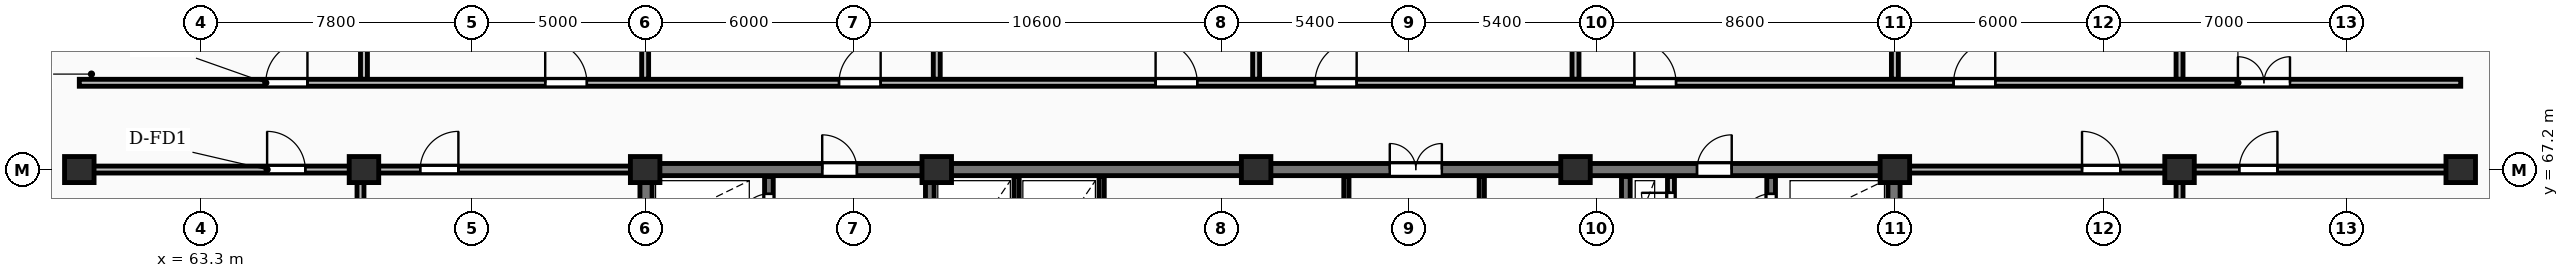
"""IFC4 building model, lengths in metres.
Left out: names, types, materials, properties, quantities, classifications, styles, units other than length and angle.
Written with IfcOpenShell. Run it as: python <this file> out.ifc"""

import sys

from ifc_helpers import new_model, si_unit, direction, frame, frame_2d, origin, origin_2d, place, context, subcontext, project, spatial, rectangle, extrude, element, fill, save


model = new_model("IFC4")
c1 = context("Model", 3, precision=1e-05, world=origin(), true_north=direction((0.0, 1.0)))
c2 = subcontext(c1, "Body", "Model", "MODEL_VIEW")
j1 = project(units=[si_unit("LENGTHUNIT", "METRE"), si_unit("PLANEANGLEUNIT", "RADIAN")], contexts=[c1])
p1 = place(None, origin())
s1 = spatial("IfcSite", under=j1, at=p1, CompositionType="ELEMENT")
p2 = place(p1, origin())
s2 = spatial("IfcBuilding", under=s1, at=p2, CompositionType="ELEMENT")
p3 = place(p2, frame((0.0, 0.0, 223.85)))
s3 = spatial("IfcBuildingStorey", under=s2, at=p3, CompositionType="ELEMENT", Elevation=223.85)
for number, where, z_axis, x_axis in (
    (1, (59.8, 67.2, 0.0), (0.0, 0.0, 1.0), (1.0, 0.0, 0.0)),
    (2, (68.0, 67.2, 0.0), (0.0, 0.0, 1.0), (1.0, 0.0, 0.0)),
    (3, (76.1, 67.2, 0.0), (0.0, 0.0, 1.0), (1.0, 0.0, 0.0)),
    (4, (84.5, 67.2, 0.0), (0.0, 0.0, 1.0), (1.0, 0.0, 0.0)),
    (5, (93.7, 67.2, 0.0), (0.0, 0.0, 1.0), (1.0, 0.0, 0.0)),
    (6, (102.9, 67.2, 0.0), (0.0, 0.0, 1.0), (1.0, 0.0, 0.0)),
    (7, (112.1, 67.2, 0.0), (0.0, 0.0, 1.0), (1.0, 0.0, 0.0)),
    (8, (120.3, 67.2, 0.0), (0.0, 0.0, 1.0), (1.0, 0.0, 0.0)),
    (9, (128.4, 67.2, 0.0), (0.0, 0.0, 1.0), (1.0, 0.0, 0.0)),
):
    element("IfcColumn", number, at=place(p3, frame(where, z_axis=z_axis, x_axis=x_axis)), inside=s3, PredefinedType="COLUMN", context=c2, shape_type="SweptSolid", body=[
        extrude(rectangle(XDim=0.85, YDim=0.75, at=origin_2d()), origin(), (0.0, 0.0, 1.0), 4.8),
    ])
for number, where, z_axis, x_axis in (
    (10, (76.125, 55.375, 0.0), (0.0, 0.0, 1.0), (0.0, 1.0, 0.0)),
    (11, (112.075, 55.375, 0.0), (0.0, 0.0, 1.0), (0.0, 1.0, 0.0)),
):
    element("IfcWall", number, at=place(p3, frame(where, z_axis=z_axis, x_axis=x_axis)), inside=s3, PredefinedType="SHEAR", context=c2, shape_type="SweptSolid", body=[
        extrude(rectangle(XDim=11.65, YDim=0.35, at=frame_2d((5.825, 0.0))), origin(), (0.0, 0.0, 1.0), 4.8),
    ])
p4 = place(p3, frame((75.95, 67.2, 0.0), z_axis=(0.0, 0.0, 1.0), x_axis=(1.0, 0.0, 0.0)))
e12 = element("IfcWall", 12, at=p4, inside=s3, PredefinedType="SHEAR", context=c2, shape_type="SweptSolid", body=[
    extrude(rectangle(XDim=36.3, YDim=0.35, at=frame_2d((18.15, 0.0))), origin(), (0.0, 0.0, 1.0), 4.8),
])
p5 = place(p4, frame((5.25, 0.0, 0.0)))
e13 = element("IfcOpeningElement", 13, at=p5, cuts=e12, PredefinedType="OPENING", context=c2, shape_type="SweptSolid", body=[
    extrude(rectangle(XDim=1.0, YDim=2.15, at=frame_2d((0.5, 1.075))), frame((0.0, 0.185, 0.0), z_axis=(0.0, -1.0, 0.0), x_axis=(1.0, 0.0, 0.0)), (0.0, 0.0, 1.0), 0.37),
])
p6 = place(p4, frame((21.6, 0.0, 0.0)))
e14 = element("IfcOpeningElement", 14, at=p6, cuts=e12, PredefinedType="OPENING", context=c2, shape_type="SweptSolid", body=[
    extrude(rectangle(XDim=1.5, YDim=2.2, at=frame_2d((0.75, 1.1))), frame((0.0, 0.185, 0.0), z_axis=(0.0, -1.0, 0.0), x_axis=(1.0, 0.0, 0.0)), (0.0, 0.0, 1.0), 0.37),
])
p7 = place(p4, frame((30.45, 0.0, 0.0)))
e15 = element("IfcOpeningElement", 15, at=p7, cuts=e12, PredefinedType="OPENING", context=c2, shape_type="SweptSolid", body=[
    extrude(rectangle(XDim=1.0, YDim=2.15, at=frame_2d((0.5, 1.075))), frame((0.0, 0.185, 0.0), z_axis=(0.0, -1.0, 0.0), x_axis=(1.0, 0.0, 0.0)), (0.0, 0.0, 1.0), 0.37),
])
p8 = place(p3, frame((79.665, 55.4, 0.0), z_axis=(0.0, 0.0, 1.0), x_axis=(0.0, 1.0, 0.0)))
e16 = element("IfcWall", 16, at=p8, inside=s3, PredefinedType="SHEAR", context=c2, shape_type="SweptSolid", body=[
    extrude(rectangle(XDim=11.6, YDim=0.25, at=frame_2d((5.8, 0.0))), origin(), (0.0, 0.0, 1.0), 4.8),
])
p9 = place(p8, frame((0.55, 0.0, 0.0)))
e17 = element("IfcOpeningElement", 17, at=p9, cuts=e16, PredefinedType="OPENING", context=c2, shape_type="SweptSolid", body=[
    extrude(rectangle(XDim=0.85, YDim=2.05, at=frame_2d((0.425, 1.025))), frame((0.0, 0.135, 0.0), z_axis=(0.0, -1.0, 0.0), x_axis=(1.0, 0.0, 0.0)), (0.0, 0.0, 1.0), 0.27),
])
p10 = place(p8, frame((8.4, 0.0, 0.0)))
e18 = element("IfcOpeningElement", 18, at=p10, cuts=e16, PredefinedType="OPENING", context=c2, shape_type="SweptSolid", body=[
    extrude(rectangle(XDim=1.1, YDim=2.1, at=frame_2d((0.55, 1.05))), frame((0.0, 0.135, 0.0), z_axis=(0.0, -1.0, 0.0), x_axis=(1.0, 0.0, 0.0)), (0.0, 0.0, 1.0), 0.27),
])
p11 = place(p8, frame((10.25, 0.0, 0.0)))
e19 = element("IfcOpeningElement", 19, at=p11, cuts=e16, PredefinedType="OPENING", context=c2, shape_type="SweptSolid", body=[
    extrude(rectangle(XDim=0.85, YDim=2.05, at=frame_2d((0.425, 1.025))), frame((0.0, 0.135, 0.0), z_axis=(0.0, -1.0, 0.0), x_axis=(1.0, 0.0, 0.0)), (0.0, 0.0, 1.0), 0.27),
])
p12 = place(p3, frame((84.3, 55.4, 0.0), z_axis=(0.0, 0.0, 1.0), x_axis=(0.0, 1.0, 0.0)))
e20 = element("IfcWall", 20, at=p12, inside=s3, PredefinedType="SHEAR", context=c2, shape_type="SweptSolid", body=[
    extrude(rectangle(XDim=11.6, YDim=0.25, at=frame_2d((5.8, 0.0))), origin(), (0.0, 0.0, 1.0), 4.8),
])
p13 = place(p12, frame((5.2, 0.0, 0.0)))
e21 = element("IfcOpeningElement", 21, at=p13, cuts=e20, PredefinedType="OPENING", context=c2, shape_type="SweptSolid", body=[
    extrude(rectangle(XDim=1.1, YDim=2.1, at=frame_2d((0.55, 1.05))), frame((0.0, 0.135, 0.0), z_axis=(0.0, -1.0, 0.0), x_axis=(1.0, 0.0, 0.0)), (0.0, 0.0, 1.0), 0.27),
])
for number, where, z_axis, x_axis in (
    (22, (86.8, 63.4, 0.0), (0.0, 0.0, 1.0), (0.0, 1.0, 0.0)),
    (23, (89.25, 63.4, 0.0), (0.0, 0.0, 1.0), (0.0, 1.0, 0.0)),
    (24, (96.3, 63.4, 0.0), (0.0, 0.0, 1.0), (0.0, 1.0, 0.0)),
    (25, (100.2, 63.4, 0.0), (0.0, 0.0, 1.0), (0.0, 1.0, 0.0)),
):
    element("IfcWall", number, at=place(p3, frame(where, z_axis=z_axis, x_axis=x_axis)), inside=s3, PredefinedType="PARTITIONING", context=c2, shape_type="SweptSolid", body=[
        extrude(rectangle(XDim=3.6, YDim=0.15, at=frame_2d((1.8, 0.0))), origin(), (0.0, 0.0, 1.0), 4.48),
    ])
p14 = place(p3, frame((105.65, 65.28, 0.0), z_axis=(0.0, 0.0, 1.0), x_axis=(0.0, 1.0, 0.0)))
e26 = element("IfcWall", 26, at=p14, inside=s3, PredefinedType="PARTITIONING", context=c2, shape_type="SweptSolid", body=[
    extrude(rectangle(XDim=1.72, YDim=0.2, at=frame_2d((0.86, 0.0))), origin(), (0.0, 0.0, 1.0), 4.48),
])
p15 = place(p14, frame((0.4, 0.0, 0.0)))
e27 = element("IfcOpeningElement", 27, at=p15, cuts=e26, PredefinedType="OPENING", context=c2, shape_type="SweptSolid", body=[
    extrude(rectangle(XDim=0.85, YDim=2.05, at=frame_2d((0.425, 1.025))), frame((0.0, 0.11, 0.0), z_axis=(0.0, -1.0, 0.0), x_axis=(1.0, 0.0, 0.0)), (0.0, 0.0, 1.0), 0.22),
])
p16 = place(p3, frame((104.35, 58.4, 0.0), z_axis=(0.0, 0.0, 1.0), x_axis=(0.0, 1.0, 0.0)))
e28 = element("IfcWall", 28, at=p16, inside=s3, PredefinedType="SHEAR", context=c2, shape_type="SweptSolid", body=[
    extrude(rectangle(XDim=8.6, YDim=0.25, at=frame_2d((4.3, 0.0))), origin(), (0.0, 0.0, 1.0), 4.8),
])
p17 = place(p16, frame((1.8, 0.0, 0.0)))
e29 = element("IfcOpeningElement", 29, at=p17, cuts=e28, PredefinedType="OPENING", context=c2, shape_type="SweptSolid", body=[
    extrude(rectangle(XDim=1.1, YDim=2.1, at=frame_2d((0.55, 1.05))), frame((0.0, 0.135, 0.0), z_axis=(0.0, -1.0, 0.0), x_axis=(1.0, 0.0, 0.0)), (0.0, 0.0, 1.0), 0.27),
])
p18 = place(p3, frame((108.535, 55.4, 0.0), z_axis=(0.0, 0.0, 1.0), x_axis=(0.0, 1.0, 0.0)))
e30 = element("IfcWall", 30, at=p18, inside=s3, PredefinedType="SHEAR", context=c2, shape_type="SweptSolid", body=[
    extrude(rectangle(XDim=11.6, YDim=0.25, at=frame_2d((5.8, 0.0))), origin(), (0.0, 0.0, 1.0), 4.8),
])
p19 = place(p18, frame((8.2, 0.0, 0.0)))
e31 = element("IfcOpeningElement", 31, at=p19, cuts=e30, PredefinedType="OPENING", context=c2, shape_type="SweptSolid", body=[
    extrude(rectangle(XDim=1.1, YDim=2.1, at=frame_2d((0.55, 1.05))), frame((0.0, 0.135, 0.0), z_axis=(0.0, -1.0, 0.0), x_axis=(1.0, 0.0, 0.0)), (0.0, 0.0, 1.0), 0.27),
])
p20 = place(p18, frame((10.25, 0.0, 0.0)))
e32 = element("IfcOpeningElement", 32, at=p20, cuts=e30, PredefinedType="OPENING", context=c2, shape_type="SweptSolid", body=[
    extrude(rectangle(XDim=0.85, YDim=2.05, at=frame_2d((0.425, 1.025))), frame((0.0, 0.135, 0.0), z_axis=(0.0, -1.0, 0.0), x_axis=(1.0, 0.0, 0.0)), (0.0, 0.0, 1.0), 0.27),
])
for number, where, z_axis, x_axis in (
    (33, (68.0, 69.8, 0.0), (0.0, 0.0, 1.0), (0.0, 1.0, 0.0)),
    (34, (76.1, 69.8, 0.0), (0.0, 0.0, 1.0), (0.0, 1.0, 0.0)),
    (35, (84.5, 69.8, 0.0), (0.0, 0.0, 1.0), (0.0, 1.0, 0.0)),
    (36, (93.7, 69.8, 0.0), (0.0, 0.0, 1.0), (0.0, 1.0, 0.0)),
    (37, (102.9, 69.8, 0.0), (0.0, 0.0, 1.0), (0.0, 1.0, 0.0)),
    (38, (112.1, 69.8, 0.0), (0.0, 0.0, 1.0), (0.0, 1.0, 0.0)),
    (39, (120.3, 69.8, 0.0), (0.0, 0.0, 1.0), (0.0, 1.0, 0.0)),
):
    element("IfcWall", number, at=place(p3, frame(where, z_axis=z_axis, x_axis=x_axis)), inside=s3, PredefinedType="PARTITIONING", context=c2, shape_type="SweptSolid", body=[
        extrude(rectangle(XDim=9.25, YDim=0.2, at=frame_2d((4.625, 0.0))), origin(), (0.0, 0.0, 1.0), 3.23),
    ])
p21 = place(p3, frame((59.8, 69.7, 0.0), z_axis=(0.0, 0.0, 1.0), x_axis=(1.0, 0.0, 0.0)))
e40 = element("IfcWall", 40, at=p21, inside=s3, PredefinedType="PARTITIONING", context=c2, shape_type="SweptSolid", body=[
    extrude(rectangle(XDim=68.6, YDim=0.2, at=frame_2d((34.3, 0.0))), origin(), (0.0, 0.0, 1.0), 4.48),
])
p22 = place(p21, frame((5.372, 0.0, 0.0)))
e41 = element("IfcOpeningElement", 41, at=p22, cuts=e40, PredefinedType="OPENING", context=c2, shape_type="SweptSolid", body=[
    extrude(rectangle(XDim=1.2, YDim=2.15, at=frame_2d((0.6, 1.075))), frame((0.0, 0.11, 0.0), z_axis=(0.0, -1.0, 0.0), x_axis=(1.0, 0.0, 0.0)), (0.0, 0.0, 1.0), 0.22),
])
p23 = place(p21, frame((13.421, 0.0, 0.0)))
e42 = element("IfcOpeningElement", 42, at=p23, cuts=e40, PredefinedType="OPENING", context=c2, shape_type="SweptSolid", body=[
    extrude(rectangle(XDim=1.2, YDim=2.15, at=frame_2d((0.6, 1.075))), frame((0.0, 0.11, 0.0), z_axis=(0.0, -1.0, 0.0), x_axis=(1.0, 0.0, 0.0)), (0.0, 0.0, 1.0), 0.22),
])
p24 = place(p21, frame((21.884, 0.0, 0.0)))
e43 = element("IfcOpeningElement", 43, at=p24, cuts=e40, PredefinedType="OPENING", context=c2, shape_type="SweptSolid", body=[
    extrude(rectangle(XDim=1.2, YDim=2.15, at=frame_2d((0.6, 1.075))), frame((0.0, 0.11, 0.0), z_axis=(0.0, -1.0, 0.0), x_axis=(1.0, 0.0, 0.0)), (0.0, 0.0, 1.0), 0.22),
])
p25 = place(p21, frame((31.004, 0.0, 0.0)))
e44 = element("IfcOpeningElement", 44, at=p25, cuts=e40, PredefinedType="OPENING", context=c2, shape_type="SweptSolid", body=[
    extrude(rectangle(XDim=1.2, YDim=2.15, at=frame_2d((0.6, 1.075))), frame((0.0, 0.11, 0.0), z_axis=(0.0, -1.0, 0.0), x_axis=(1.0, 0.0, 0.0)), (0.0, 0.0, 1.0), 0.22),
])
p26 = place(p21, frame((35.596, 0.0, 0.0)))
e45 = element("IfcOpeningElement", 45, at=p26, cuts=e40, PredefinedType="OPENING", context=c2, shape_type="SweptSolid", body=[
    extrude(rectangle(XDim=1.2, YDim=2.15, at=frame_2d((0.6, 1.075))), frame((0.0, 0.11, 0.0), z_axis=(0.0, -1.0, 0.0), x_axis=(1.0, 0.0, 0.0)), (0.0, 0.0, 1.0), 0.22),
])
p27 = place(p21, frame((44.796, 0.0, 0.0)))
e46 = element("IfcOpeningElement", 46, at=p27, cuts=e40, PredefinedType="OPENING", context=c2, shape_type="SweptSolid", body=[
    extrude(rectangle(XDim=1.2, YDim=2.15, at=frame_2d((0.6, 1.075))), frame((0.0, 0.11, 0.0), z_axis=(0.0, -1.0, 0.0), x_axis=(1.0, 0.0, 0.0)), (0.0, 0.0, 1.0), 0.22),
])
p28 = place(p21, frame((53.991, 0.0, 0.0)))
e47 = element("IfcOpeningElement", 47, at=p28, cuts=e40, PredefinedType="OPENING", context=c2, shape_type="SweptSolid", body=[
    extrude(rectangle(XDim=1.2, YDim=2.15, at=frame_2d((0.6, 1.075))), frame((0.0, 0.11, 0.0), z_axis=(0.0, -1.0, 0.0), x_axis=(1.0, 0.0, 0.0)), (0.0, 0.0, 1.0), 0.22),
])
p29 = place(p21, frame((62.182, 0.0, 0.0)))
e48 = element("IfcOpeningElement", 48, at=p29, cuts=e40, PredefinedType="OPENING", context=c2, shape_type="SweptSolid", body=[
    extrude(rectangle(XDim=1.5, YDim=2.18, at=frame_2d((0.75, 1.09))), frame((0.0, 0.11, 0.0), z_axis=(0.0, -1.0, 0.0), x_axis=(1.0, 0.0, 0.0)), (0.0, 0.0, 1.0), 0.22),
])
p30 = place(p3, frame((67.9, 51.75, 0.0), z_axis=(0.0, 0.0, 1.0), x_axis=(0.0, 1.0, 0.0)))
e49 = element("IfcWall", 49, at=p30, inside=s3, PredefinedType="PARTITIONING", context=c2, shape_type="SweptSolid", body=[
    extrude(rectangle(XDim=15.4, YDim=0.2, at=frame_2d((7.7, 0.0))), origin(), (0.0, 0.0, 1.0), 3.23),
])
p31 = place(p3, frame((59.85, 67.2, 0.0), z_axis=(0.0, 0.0, 1.0), x_axis=(1.0, 0.0, 0.0)))
e50 = element("IfcWall", 50, at=p31, inside=s3, PredefinedType="PARTITIONING", context=c2, shape_type="SweptSolid", body=[
    extrude(rectangle(XDim=16.1, YDim=0.2, at=frame_2d((8.05, 0.0))), origin(), (0.0, 0.0, 1.0), 3.23),
])
p32 = place(p31, frame((5.36, 0.0, 0.0)))
e51 = element("IfcOpeningElement", 51, at=p32, cuts=e50, PredefinedType="OPENING", context=c2, shape_type="SweptSolid", body=[
    extrude(rectangle(XDim=1.1, YDim=2.1, at=frame_2d((0.55, 1.05))), frame((0.0, 0.11, 0.0), z_axis=(0.0, -1.0, 0.0), x_axis=(1.0, 0.0, 0.0)), (0.0, 0.0, 1.0), 0.22),
])
p33 = place(p31, frame((9.77, 0.0, 0.0)))
e52 = element("IfcOpeningElement", 52, at=p33, cuts=e50, PredefinedType="OPENING", context=c2, shape_type="SweptSolid", body=[
    extrude(rectangle(XDim=1.1, YDim=2.1, at=frame_2d((0.55, 1.05))), frame((0.0, 0.11, 0.0), z_axis=(0.0, -1.0, 0.0), x_axis=(1.0, 0.0, 0.0)), (0.0, 0.0, 1.0), 0.22),
])
p34 = place(p3, frame((120.3, 51.75, 0.0), z_axis=(0.0, 0.0, 1.0), x_axis=(0.0, 1.0, 0.0)))
e53 = element("IfcWall", 53, at=p34, inside=s3, PredefinedType="PARTITIONING", context=c2, shape_type="SweptSolid", body=[
    extrude(rectangle(XDim=15.4, YDim=0.2, at=frame_2d((7.7, 0.0))), origin(), (0.0, 0.0, 1.0), 3.23),
])
p35 = place(p3, frame((112.25, 67.2, 0.0), z_axis=(0.0, 0.0, 1.0), x_axis=(1.0, 0.0, 0.0)))
e54 = element("IfcWall", 54, at=p35, inside=s3, PredefinedType="PARTITIONING", context=c2, shape_type="SweptSolid", body=[
    extrude(rectangle(XDim=16.1, YDim=0.2, at=frame_2d((8.05, 0.0))), origin(), (0.0, 0.0, 1.0), 3.23),
])
p36 = place(p35, frame((5.241, 0.0, 0.0)))
e55 = element("IfcOpeningElement", 55, at=p36, cuts=e54, PredefinedType="OPENING", context=c2, shape_type="SweptSolid", body=[
    extrude(rectangle(XDim=1.1, YDim=2.1, at=frame_2d((0.55, 1.05))), frame((0.0, 0.11, 0.0), z_axis=(0.0, -1.0, 0.0), x_axis=(1.0, 0.0, 0.0)), (0.0, 0.0, 1.0), 0.22),
])
p37 = place(p35, frame((9.77, 0.0, 0.0)))
e56 = element("IfcOpeningElement", 56, at=p37, cuts=e54, PredefinedType="OPENING", context=c2, shape_type="SweptSolid", body=[
    extrude(rectangle(XDim=1.1, YDim=2.1, at=frame_2d((0.55, 1.05))), frame((0.0, 0.11, 0.0), z_axis=(0.0, -1.0, 0.0), x_axis=(1.0, 0.0, 0.0)), (0.0, 0.0, 1.0), 0.22),
])
p38 = place(p5, origin())
e57 = element("IfcDoor", 57, at=p38, inside=s3, OperationType="SINGLE_SWING_LEFT", PredefinedType="DOOR", context=c2, shape_type="SweptSolid", body=[
    extrude(rectangle(XDim=1.0, YDim=2.15, at=frame_2d((0.5, 1.075))), frame((0.0, 0.025, 0.0), z_axis=(0.0, -1.0, 0.0), x_axis=(1.0, 0.0, 0.0)), (0.0, 0.0, 1.0), 0.05),
])
fill(e13, e57)
p39 = place(p6, origin())
e58 = element("IfcDoor", 58, at=p39, inside=s3, OperationType="DOUBLE_DOOR_SINGLE_SWING", PredefinedType="DOOR", context=c2, shape_type="SweptSolid", body=[
    extrude(rectangle(XDim=1.5, YDim=2.2, at=frame_2d((0.75, 1.1))), frame((0.0, 0.025, 0.0), z_axis=(0.0, -1.0, 0.0), x_axis=(1.0, 0.0, 0.0)), (0.0, 0.0, 1.0), 0.05),
])
fill(e14, e58)
p40 = place(p7, origin())
e59 = element("IfcDoor", 59, at=p40, inside=s3, OperationType="SINGLE_SWING_RIGHT", PredefinedType="DOOR", context=c2, shape_type="SweptSolid", body=[
    extrude(rectangle(XDim=1.0, YDim=2.15, at=frame_2d((0.5, 1.075))), frame((0.0, 0.025, 0.0), z_axis=(0.0, -1.0, 0.0), x_axis=(1.0, 0.0, 0.0)), (0.0, 0.0, 1.0), 0.05),
])
fill(e15, e59)
p41 = place(p11, origin())
e60 = element("IfcDoor", 60, at=p41, inside=s3, OperationType="SINGLE_SWING_LEFT", PredefinedType="DOOR", context=c2, shape_type="SweptSolid", body=[
    extrude(rectangle(XDim=0.85, YDim=2.05, at=frame_2d((0.425, 1.025))), frame((0.0, 0.025, 0.0), z_axis=(0.0, -1.0, 0.0), x_axis=(1.0, 0.0, 0.0)), (0.0, 0.0, 1.0), 0.05),
])
fill(e19, e60)
p42 = place(p15, origin())
e61 = element("IfcDoor", 61, at=p42, inside=s3, OperationType="SINGLE_SWING_RIGHT", PredefinedType="DOOR", context=c2, shape_type="SweptSolid", body=[
    extrude(rectangle(XDim=0.85, YDim=2.05, at=frame_2d((0.425, 1.025))), frame((0.0, 0.025, 0.0), z_axis=(0.0, -1.0, 0.0), x_axis=(1.0, 0.0, 0.0)), (0.0, 0.0, 1.0), 0.05),
])
fill(e27, e61)
p43 = place(p20, origin())
e62 = element("IfcDoor", 62, at=p43, inside=s3, OperationType="SINGLE_SWING_LEFT", PredefinedType="DOOR", context=c2, shape_type="SweptSolid", body=[
    extrude(rectangle(XDim=0.85, YDim=2.05, at=frame_2d((0.425, 1.025))), frame((0.0, 0.025, 0.0), z_axis=(0.0, -1.0, 0.0), x_axis=(1.0, 0.0, 0.0)), (0.0, 0.0, 1.0), 0.05),
])
fill(e32, e62)
p44 = place(p22, origin())
e63 = element("IfcDoor", 63, at=p44, inside=s3, OperationType="SINGLE_SWING_RIGHT", PredefinedType="DOOR", context=c2, shape_type="SweptSolid", body=[
    extrude(rectangle(XDim=1.2, YDim=2.15, at=frame_2d((0.6, 1.075))), frame((0.0, 0.025, 0.0), z_axis=(0.0, -1.0, 0.0), x_axis=(1.0, 0.0, 0.0)), (0.0, 0.0, 1.0), 0.05),
])
fill(e41, e63)
p45 = place(p23, origin())
e64 = element("IfcDoor", 64, at=p45, inside=s3, OperationType="SINGLE_SWING_LEFT", PredefinedType="DOOR", context=c2, shape_type="SweptSolid", body=[
    extrude(rectangle(XDim=1.2, YDim=2.15, at=frame_2d((0.6, 1.075))), frame((0.0, 0.025, 0.0), z_axis=(0.0, -1.0, 0.0), x_axis=(1.0, 0.0, 0.0)), (0.0, 0.0, 1.0), 0.05),
])
fill(e42, e64)
p46 = place(p24, origin())
e65 = element("IfcDoor", 65, at=p46, inside=s3, OperationType="SINGLE_SWING_RIGHT", PredefinedType="DOOR", context=c2, shape_type="SweptSolid", body=[
    extrude(rectangle(XDim=1.2, YDim=2.15, at=frame_2d((0.6, 1.075))), frame((0.0, 0.025, 0.0), z_axis=(0.0, -1.0, 0.0), x_axis=(1.0, 0.0, 0.0)), (0.0, 0.0, 1.0), 0.05),
])
fill(e43, e65)
p47 = place(p25, origin())
e66 = element("IfcDoor", 66, at=p47, inside=s3, OperationType="SINGLE_SWING_LEFT", PredefinedType="DOOR", context=c2, shape_type="SweptSolid", body=[
    extrude(rectangle(XDim=1.2, YDim=2.15, at=frame_2d((0.6, 1.075))), frame((0.0, 0.025, 0.0), z_axis=(0.0, -1.0, 0.0), x_axis=(1.0, 0.0, 0.0)), (0.0, 0.0, 1.0), 0.05),
])
fill(e44, e66)
p48 = place(p26, origin())
e67 = element("IfcDoor", 67, at=p48, inside=s3, OperationType="SINGLE_SWING_RIGHT", PredefinedType="DOOR", context=c2, shape_type="SweptSolid", body=[
    extrude(rectangle(XDim=1.2, YDim=2.15, at=frame_2d((0.6, 1.075))), frame((0.0, 0.025, 0.0), z_axis=(0.0, -1.0, 0.0), x_axis=(1.0, 0.0, 0.0)), (0.0, 0.0, 1.0), 0.05),
])
fill(e45, e67)
p49 = place(p27, origin())
e68 = element("IfcDoor", 68, at=p49, inside=s3, OperationType="SINGLE_SWING_LEFT", PredefinedType="DOOR", context=c2, shape_type="SweptSolid", body=[
    extrude(rectangle(XDim=1.2, YDim=2.15, at=frame_2d((0.6, 1.075))), frame((0.0, 0.025, 0.0), z_axis=(0.0, -1.0, 0.0), x_axis=(1.0, 0.0, 0.0)), (0.0, 0.0, 1.0), 0.05),
])
fill(e46, e68)
p50 = place(p28, origin())
e69 = element("IfcDoor", 69, at=p50, inside=s3, OperationType="SINGLE_SWING_RIGHT", PredefinedType="DOOR", context=c2, shape_type="SweptSolid", body=[
    extrude(rectangle(XDim=1.2, YDim=2.15, at=frame_2d((0.6, 1.075))), frame((0.0, 0.025, 0.0), z_axis=(0.0, -1.0, 0.0), x_axis=(1.0, 0.0, 0.0)), (0.0, 0.0, 1.0), 0.05),
])
fill(e47, e69)
p51 = place(p29, origin())
e70 = element("IfcDoor", 70, at=p51, inside=s3, OperationType="DOUBLE_DOOR_SINGLE_SWING", PredefinedType="DOOR", context=c2, shape_type="SweptSolid", body=[
    extrude(rectangle(XDim=1.5, YDim=2.18, at=frame_2d((0.75, 1.09))), frame((0.0, 0.025, 0.0), z_axis=(0.0, -1.0, 0.0), x_axis=(1.0, 0.0, 0.0)), (0.0, 0.0, 1.0), 0.05),
])
fill(e48, e70)
p52 = place(p32, origin())
e71 = element("IfcDoor", 71, at=p52, inside=s3, OperationType="SINGLE_SWING_LEFT", PredefinedType="DOOR", context=c2, shape_type="SweptSolid", body=[
    extrude(rectangle(XDim=1.1, YDim=2.1, at=frame_2d((0.55, 1.05))), frame((0.0, 0.025, 0.0), z_axis=(0.0, -1.0, 0.0), x_axis=(1.0, 0.0, 0.0)), (0.0, 0.0, 1.0), 0.05),
])
fill(e51, e71)
p53 = place(p33, origin())
e72 = element("IfcDoor", 72, at=p53, inside=s3, OperationType="SINGLE_SWING_RIGHT", PredefinedType="DOOR", context=c2, shape_type="SweptSolid", body=[
    extrude(rectangle(XDim=1.1, YDim=2.1, at=frame_2d((0.55, 1.05))), frame((0.0, 0.025, 0.0), z_axis=(0.0, -1.0, 0.0), x_axis=(1.0, 0.0, 0.0)), (0.0, 0.0, 1.0), 0.05),
])
fill(e52, e72)
p54 = place(p36, origin())
e73 = element("IfcDoor", 73, at=p54, inside=s3, OperationType="SINGLE_SWING_LEFT", PredefinedType="DOOR", context=c2, shape_type="SweptSolid", body=[
    extrude(rectangle(XDim=1.1, YDim=2.1, at=frame_2d((0.55, 1.05))), frame((0.0, 0.025, 0.0), z_axis=(0.0, -1.0, 0.0), x_axis=(1.0, 0.0, 0.0)), (0.0, 0.0, 1.0), 0.05),
])
fill(e55, e73)
p55 = place(p37, origin())
e74 = element("IfcDoor", 74, at=p55, inside=s3, OperationType="SINGLE_SWING_RIGHT", PredefinedType="DOOR", context=c2, shape_type="SweptSolid", body=[
    extrude(rectangle(XDim=1.1, YDim=2.1, at=frame_2d((0.55, 1.05))), frame((0.0, 0.025, 0.0), z_axis=(0.0, -1.0, 0.0), x_axis=(1.0, 0.0, 0.0)), (0.0, 0.0, 1.0), 0.05),
])
fill(e56, e74)
save(model, sys.argv[1])
